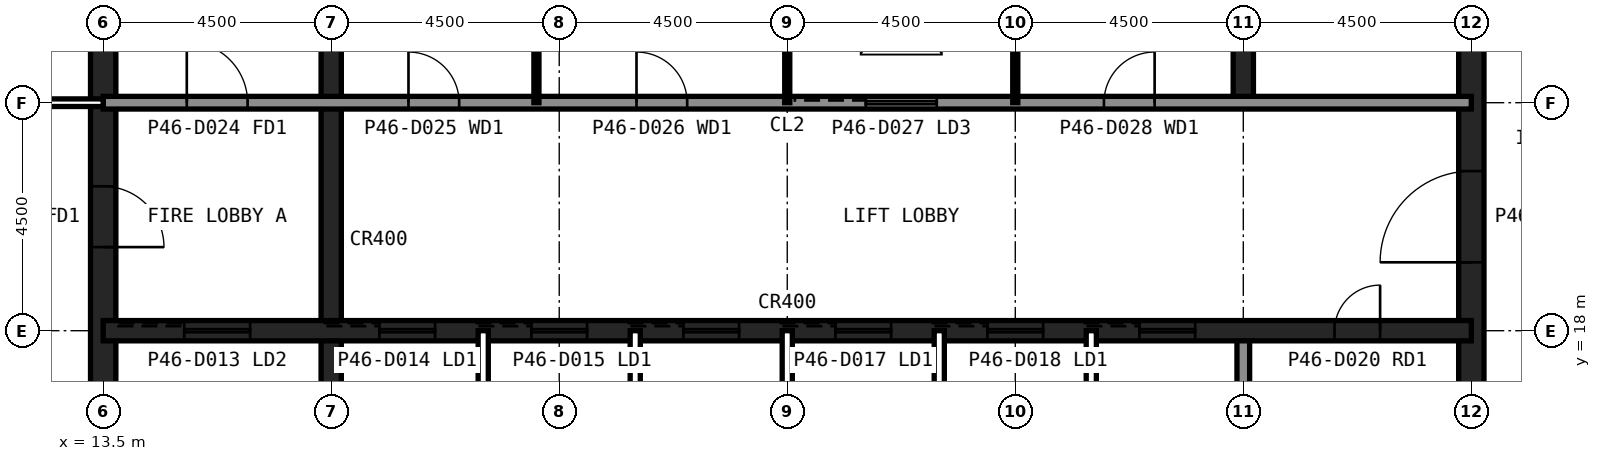
"""IFC4 building model, lengths in metres.
Left out: names, types, materials, properties, quantities, classifications, styles, units other than length and angle.
Written with IfcOpenShell. Run it as: python <this file> out.ifc"""

import sys

from ifc_helpers import new_model, si_unit, direction, frame, frame_2d, origin, place, context, subcontext, project, spatial, rectangle, extrude, element, fill, save


model = new_model("IFC4")
c1 = context("Model", 3, precision=1e-05, world=origin(), true_north=direction((0.0, 1.0)))
c2 = subcontext(c1, "Body", "Model", "MODEL_VIEW")
j1 = project(units=[si_unit("LENGTHUNIT", "METRE"), si_unit("PLANEANGLEUNIT", "RADIAN")], contexts=[c1])
p1 = place(None, origin())
s1 = spatial("IfcSite", under=j1, at=p1, CompositionType="ELEMENT")
p2 = place(p1, origin())
s2 = spatial("IfcBuilding", under=s1, at=p2, CompositionType="ELEMENT")
p3 = place(p2, frame((0.0, 0.0, 191.6)))
s3 = spatial("IfcBuildingStorey", under=s2, at=p3, CompositionType="ELEMENT", Elevation=191.6)
p4 = place(p3, frame((40.5, 13.5, 0.0), z_axis=(0.0, 0.0, 1.0), x_axis=(0.0, 1.0, 0.0)))
e1 = element("IfcWall", 1, at=p4, inside=s3, PredefinedType="SHEAR", context=c2, shape_type="SweptSolid", body=[
    extrude(rectangle(XDim=27.0, YDim=0.5, at=frame_2d((13.5, 0.0))), origin(), (0.0, 0.0, 1.0), 4.0),
])
p5 = place(p4, frame((5.85, 0.0, 0.0)))
e2 = element("IfcOpeningElement", 2, at=p5, cuts=e1, PredefinedType="OPENING", context=c2, shape_type="SweptSolid", body=[
    extrude(rectangle(XDim=1.8, YDim=2.1, at=frame_2d((0.9, 1.05))), frame((0.0, 0.26, 0.0), z_axis=(0.0, -1.0, 0.0), x_axis=(1.0, 0.0, 0.0)), (0.0, 0.0, 1.0), 0.52),
])
p6 = place(p4, frame((19.65, 0.0, 0.0)))
e3 = element("IfcOpeningElement", 3, at=p6, cuts=e1, PredefinedType="OPENING", context=c2, shape_type="SweptSolid", body=[
    extrude(rectangle(XDim=1.2, YDim=2.1, at=frame_2d((0.6, 1.05))), frame((0.0, 0.26, 0.0), z_axis=(0.0, -1.0, 0.0), x_axis=(1.0, 0.0, 0.0)), (0.0, 0.0, 1.0), 0.52),
])
p7 = place(p3, frame((13.5, 40.5, 0.0), z_axis=(0.0, 0.0, 1.0), x_axis=(0.0, -1.0, 0.0)))
e4 = element("IfcWall", 4, at=p7, inside=s3, PredefinedType="SHEAR", context=c2, shape_type="SweptSolid", body=[
    extrude(rectangle(XDim=27.0, YDim=0.5, at=frame_2d((13.5, 0.0))), origin(), (0.0, 0.0, 1.0), 4.0),
])
p8 = place(p7, frame((19.65, 0.0, 0.0)))
e5 = element("IfcOpeningElement", 5, at=p8, cuts=e4, PredefinedType="OPENING", context=c2, shape_type="SweptSolid", body=[
    extrude(rectangle(XDim=1.2, YDim=2.1, at=frame_2d((0.6, 1.05))), frame((0.0, 0.26, 0.0), z_axis=(0.0, -1.0, 0.0), x_axis=(1.0, 0.0, 0.0)), (0.0, 0.0, 1.0), 0.52),
])
p9 = place(p7, frame((5.85, 0.0, 0.0)))
e6 = element("IfcOpeningElement", 6, at=p9, cuts=e4, PredefinedType="OPENING", context=c2, shape_type="SweptSolid", body=[
    extrude(rectangle(XDim=1.8, YDim=2.1, at=frame_2d((0.9, 1.05))), frame((0.0, 0.26, 0.0), z_axis=(0.0, -1.0, 0.0), x_axis=(1.0, 0.0, 0.0)), (0.0, 0.0, 1.0), 0.52),
])
p10 = place(p3, frame((18.0, 13.5, 0.0), z_axis=(0.0, 0.0, 1.0), x_axis=(0.0, 1.0, 0.0)))
e7 = element("IfcWall", 7, at=p10, inside=s3, PredefinedType="SHEAR", context=c2, shape_type="SweptSolid", body=[
    extrude(rectangle(XDim=18.0, YDim=0.4, at=frame_2d((9.0, 0.0))), origin(), (0.0, 0.0, 1.0), 4.0),
])
p11 = place(p3, frame((36.0, 13.5, 0.0), z_axis=(0.0, 0.0, 1.0), x_axis=(0.0, 1.0, 0.0)))
e8 = element("IfcWall", 8, at=p11, inside=s3, PredefinedType="SOLIDWALL", context=c2, shape_type="SweptSolid", body=[
    extrude(rectangle(XDim=4.5, YDim=0.25, at=frame_2d((2.25, 0.0))), origin(), (0.0, 0.0, 1.0), 3.84),
])
p12 = place(p3, frame((36.0, 22.5, 0.0), z_axis=(0.0, 0.0, 1.0), x_axis=(0.0, 1.0, 0.0)))
e9 = element("IfcWall", 9, at=p12, inside=s3, PredefinedType="SHEAR", context=c2, shape_type="SweptSolid", body=[
    extrude(rectangle(XDim=18.0, YDim=0.4, at=frame_2d((9.0, 0.0))), origin(), (0.0, 0.0, 1.0), 4.0),
])
p13 = place(p3, frame((13.5, 18.0, 0.0), z_axis=(0.0, 0.0, 1.0), x_axis=(1.0, 0.0, 0.0)))
e10 = element("IfcWall", 10, at=p13, inside=s3, PredefinedType="SHEAR", context=c2, shape_type="SweptSolid", body=[
    extrude(rectangle(XDim=27.0, YDim=0.4, at=frame_2d((13.5, 0.0))), origin(), (0.0, 0.0, 1.0), 4.0),
])
p14 = place(p13, frame((24.3, 0.0, 0.0)))
e11 = element("IfcOpeningElement", 11, at=p14, cuts=e10, PredefinedType="OPENING", context=c2, shape_type="SweptSolid", body=[
    extrude(rectangle(XDim=0.9, YDim=2.1, at=frame_2d((0.45, 1.05))), frame((0.0, 0.21, 0.0), z_axis=(0.0, -1.0, 0.0), x_axis=(1.0, 0.0, 0.0)), (0.0, 0.0, 1.0), 0.42),
])
p15 = place(p13, frame((5.45, 0.0, 0.0)))
e12 = element("IfcOpeningElement", 12, at=p15, cuts=e10, PredefinedType="OPENING", context=c2, shape_type="SweptSolid", body=[
    extrude(rectangle(XDim=1.1, YDim=2.1, at=frame_2d((0.55, 1.05))), frame((0.0, 0.21, 0.0), z_axis=(0.0, -1.0, 0.0), x_axis=(1.0, 0.0, 0.0)), (0.0, 0.0, 1.0), 0.42),
])
p16 = place(p13, frame((8.45, 0.0, 0.0)))
e13 = element("IfcOpeningElement", 13, at=p16, cuts=e10, PredefinedType="OPENING", context=c2, shape_type="SweptSolid", body=[
    extrude(rectangle(XDim=1.1, YDim=2.1, at=frame_2d((0.55, 1.05))), frame((0.0, 0.21, 0.0), z_axis=(0.0, -1.0, 0.0), x_axis=(1.0, 0.0, 0.0)), (0.0, 0.0, 1.0), 0.42),
])
p17 = place(p13, frame((11.45, 0.0, 0.0)))
e14 = element("IfcOpeningElement", 14, at=p17, cuts=e10, PredefinedType="OPENING", context=c2, shape_type="SweptSolid", body=[
    extrude(rectangle(XDim=1.1, YDim=2.1, at=frame_2d((0.55, 1.05))), frame((0.0, 0.21, 0.0), z_axis=(0.0, -1.0, 0.0), x_axis=(1.0, 0.0, 0.0)), (0.0, 0.0, 1.0), 0.42),
])
p18 = place(p13, frame((14.45, 0.0, 0.0)))
e15 = element("IfcOpeningElement", 15, at=p18, cuts=e10, PredefinedType="OPENING", context=c2, shape_type="SweptSolid", body=[
    extrude(rectangle(XDim=1.1, YDim=2.1, at=frame_2d((0.55, 1.05))), frame((0.0, 0.21, 0.0), z_axis=(0.0, -1.0, 0.0), x_axis=(1.0, 0.0, 0.0)), (0.0, 0.0, 1.0), 0.42),
])
p19 = place(p13, frame((17.45, 0.0, 0.0)))
e16 = element("IfcOpeningElement", 16, at=p19, cuts=e10, PredefinedType="OPENING", context=c2, shape_type="SweptSolid", body=[
    extrude(rectangle(XDim=1.1, YDim=2.1, at=frame_2d((0.55, 1.05))), frame((0.0, 0.21, 0.0), z_axis=(0.0, -1.0, 0.0), x_axis=(1.0, 0.0, 0.0)), (0.0, 0.0, 1.0), 0.42),
])
p20 = place(p13, frame((20.45, 0.0, 0.0)))
e17 = element("IfcOpeningElement", 17, at=p20, cuts=e10, PredefinedType="OPENING", context=c2, shape_type="SweptSolid", body=[
    extrude(rectangle(XDim=1.1, YDim=2.1, at=frame_2d((0.55, 1.05))), frame((0.0, 0.21, 0.0), z_axis=(0.0, -1.0, 0.0), x_axis=(1.0, 0.0, 0.0)), (0.0, 0.0, 1.0), 0.42),
])
p21 = place(p13, frame((1.6, 0.0, 0.0)))
e18 = element("IfcOpeningElement", 18, at=p21, cuts=e10, PredefinedType="OPENING", context=c2, shape_type="SweptSolid", body=[
    extrude(rectangle(XDim=1.3, YDim=2.2, at=frame_2d((0.65, 1.1))), frame((0.0, 0.21, 0.0), z_axis=(0.0, -1.0, 0.0), x_axis=(1.0, 0.0, 0.0)), (0.0, 0.0, 1.0), 0.42),
])
p22 = place(p3, frame((13.5, 22.5, 0.0), z_axis=(0.0, 0.0, 1.0), x_axis=(1.0, 0.0, 0.0)))
e19 = element("IfcWall", 19, at=p22, inside=s3, PredefinedType="SOLIDWALL", context=c2, shape_type="SweptSolid", body=[
    extrude(rectangle(XDim=27.0, YDim=0.25, at=frame_2d((13.5, 0.0))), origin(), (0.0, 0.0, 1.0), 3.84),
])
p23 = place(p22, frame((1.65, 0.0, 0.0)))
e20 = element("IfcOpeningElement", 20, at=p23, cuts=e19, PredefinedType="OPENING", context=c2, shape_type="SweptSolid", body=[
    extrude(rectangle(XDim=1.2, YDim=2.1, at=frame_2d((0.6, 1.05))), frame((0.0, 0.135, 0.0), z_axis=(0.0, -1.0, 0.0), x_axis=(1.0, 0.0, 0.0)), (0.0, 0.0, 1.0), 0.27),
])
p24 = place(p22, frame((6.025, 0.0, 0.0)))
e21 = element("IfcOpeningElement", 21, at=p24, cuts=e19, PredefinedType="OPENING", context=c2, shape_type="SweptSolid", body=[
    extrude(rectangle(XDim=1.0, YDim=2.1, at=frame_2d((0.5, 1.05))), frame((0.0, 0.135, 0.0), z_axis=(0.0, -1.0, 0.0), x_axis=(1.0, 0.0, 0.0)), (0.0, 0.0, 1.0), 0.27),
])
p25 = place(p22, frame((10.525, 0.0, 0.0)))
e22 = element("IfcOpeningElement", 22, at=p25, cuts=e19, PredefinedType="OPENING", context=c2, shape_type="SweptSolid", body=[
    extrude(rectangle(XDim=1.0, YDim=2.1, at=frame_2d((0.5, 1.05))), frame((0.0, 0.135, 0.0), z_axis=(0.0, -1.0, 0.0), x_axis=(1.0, 0.0, 0.0)), (0.0, 0.0, 1.0), 0.27),
])
p26 = place(p22, frame((19.75, 0.0, 0.0)))
e23 = element("IfcOpeningElement", 23, at=p26, cuts=e19, PredefinedType="OPENING", context=c2, shape_type="SweptSolid", body=[
    extrude(rectangle(XDim=1.0, YDim=2.1, at=frame_2d((0.5, 1.05))), frame((0.0, 0.135, 0.0), z_axis=(0.0, -1.0, 0.0), x_axis=(1.0, 0.0, 0.0)), (0.0, 0.0, 1.0), 0.27),
])
p27 = place(p22, frame((15.05, 0.0, 0.0)))
e24 = element("IfcOpeningElement", 24, at=p27, cuts=e19, PredefinedType="OPENING", context=c2, shape_type="SweptSolid", body=[
    extrude(rectangle(XDim=1.4, YDim=2.4, at=frame_2d((0.7, 1.2))), frame((0.0, 0.135, 0.0), z_axis=(0.0, -1.0, 0.0), x_axis=(1.0, 0.0, 0.0)), (0.0, 0.0, 1.0), 0.27),
])
for number, where, z_axis, x_axis in (
    (25, (21.0, 13.5, 0.0), (0.0, 0.0, 1.0), (0.0, 1.0, 0.0)),
    (26, (24.0, 13.5, 0.0), (0.0, 0.0, 1.0), (0.0, 1.0, 0.0)),
    (27, (27.0, 13.5, 0.0), (0.0, 0.0, 1.0), (0.0, 1.0, 0.0)),
    (28, (30.0, 13.5, 0.0), (0.0, 0.0, 1.0), (0.0, 1.0, 0.0)),
    (29, (33.0, 13.5, 0.0), (0.0, 0.0, 1.0), (0.0, 1.0, 0.0)),
):
    element("IfcWall", number, at=place(p3, frame(where, z_axis=z_axis, x_axis=x_axis)), inside=s3, PredefinedType="PARTITIONING", context=c2, shape_type="SweptSolid", body=[
        extrude(rectangle(XDim=4.5, YDim=0.2, at=frame_2d((2.25, 0.0))), origin(), (0.0, 0.0, 1.0), 3.84),
    ])
for number, where, z_axis, x_axis in (
    (30, (22.05, 22.5, 0.0), (0.0, 0.0, 1.0), (0.0, 1.0, 0.0)),
    (31, (27.0, 22.5, 0.0), (0.0, 0.0, 1.0), (0.0, 1.0, 0.0)),
    (32, (31.5, 22.5, 0.0), (0.0, 0.0, 1.0), (0.0, 1.0, 0.0)),
):
    element("IfcWall", number, at=place(p3, frame(where, z_axis=z_axis, x_axis=x_axis)), inside=s3, PredefinedType="PLUMBINGWALL", context=c2, shape_type="SweptSolid", body=[
        extrude(rectangle(XDim=9.0, YDim=0.1, at=frame_2d((4.5, 0.0))), origin(), (0.0, 0.0, 1.0), 3.84),
    ])
p28 = place(p3, frame((9.9, 22.5, 0.0), z_axis=(0.0, 0.0, 1.0), x_axis=(1.0, 0.0, 0.0)))
e33 = element("IfcWall", 33, at=p28, inside=s3, PredefinedType="PARTITIONING", context=c2, shape_type="SweptSolid", body=[
    extrude(rectangle(XDim=3.6, YDim=0.15, at=frame_2d((1.8, 0.0))), origin(), (0.0, 0.0, 1.0), 2.989),
])
p29 = place(p8, origin())
e34 = element("IfcDoor", 34, at=p29, inside=s3, OperationType="SINGLE_SWING_RIGHT", PredefinedType="DOOR", context=c2, shape_type="SweptSolid", body=[
    extrude(rectangle(XDim=1.2, YDim=2.1, at=frame_2d((0.6, 1.05))), frame((0.0, 0.025, 0.0), z_axis=(0.0, -1.0, 0.0), x_axis=(1.0, 0.0, 0.0)), (0.0, 0.0, 1.0), 0.05),
])
fill(e5, e34)
p30 = place(p5, origin())
e35 = element("IfcDoor", 35, at=p30, inside=s3, OperationType="SINGLE_SWING_LEFT", PredefinedType="DOOR", context=c2, shape_type="SweptSolid", body=[
    extrude(rectangle(XDim=1.8, YDim=2.1, at=frame_2d((0.9, 1.05))), frame((0.0, 0.025, 0.0), z_axis=(0.0, -1.0, 0.0), x_axis=(1.0, 0.0, 0.0)), (0.0, 0.0, 1.0), 0.05),
])
fill(e2, e35)
p31 = place(p23, origin())
e36 = element("IfcDoor", 36, at=p31, inside=s3, OperationType="SINGLE_SWING_LEFT", PredefinedType="DOOR", context=c2, shape_type="SweptSolid", body=[
    extrude(rectangle(XDim=1.2, YDim=2.1, at=frame_2d((0.6, 1.05))), frame((0.0, 0.025, 0.0), z_axis=(0.0, -1.0, 0.0), x_axis=(1.0, 0.0, 0.0)), (0.0, 0.0, 1.0), 0.05),
])
fill(e20, e36)
p32 = place(p24, origin())
e37 = element("IfcDoor", 37, at=p32, inside=s3, OperationType="SINGLE_SWING_LEFT", PredefinedType="DOOR", context=c2, shape_type="SweptSolid", body=[
    extrude(rectangle(XDim=1.0, YDim=2.1, at=frame_2d((0.5, 1.05))), frame((0.0, 0.025, 0.0), z_axis=(0.0, -1.0, 0.0), x_axis=(1.0, 0.0, 0.0)), (0.0, 0.0, 1.0), 0.05),
])
fill(e21, e37)
p33 = place(p25, origin())
e38 = element("IfcDoor", 38, at=p33, inside=s3, OperationType="SINGLE_SWING_LEFT", PredefinedType="DOOR", context=c2, shape_type="SweptSolid", body=[
    extrude(rectangle(XDim=1.0, YDim=2.1, at=frame_2d((0.5, 1.05))), frame((0.0, 0.025, 0.0), z_axis=(0.0, -1.0, 0.0), x_axis=(1.0, 0.0, 0.0)), (0.0, 0.0, 1.0), 0.05),
])
fill(e22, e38)
p34 = place(p26, origin())
e39 = element("IfcDoor", 39, at=p34, inside=s3, OperationType="SINGLE_SWING_RIGHT", PredefinedType="DOOR", context=c2, shape_type="SweptSolid", body=[
    extrude(rectangle(XDim=1.0, YDim=2.1, at=frame_2d((0.5, 1.05))), frame((0.0, 0.025, 0.0), z_axis=(0.0, -1.0, 0.0), x_axis=(1.0, 0.0, 0.0)), (0.0, 0.0, 1.0), 0.05),
])
fill(e23, e39)
p35 = place(p14, origin())
e40 = element("IfcDoor", 40, at=p35, inside=s3, OperationType="SINGLE_SWING_RIGHT", PredefinedType="DOOR", context=c2, shape_type="SweptSolid", body=[
    extrude(rectangle(XDim=0.9, YDim=2.1, at=frame_2d((0.45, 1.05))), frame((0.0, 0.025, 0.0), z_axis=(0.0, -1.0, 0.0), x_axis=(1.0, 0.0, 0.0)), (0.0, 0.0, 1.0), 0.05),
])
fill(e11, e40)
p36 = place(p15, origin())
e41 = element("IfcDoor", 41, at=p36, inside=s3, OperationType="SLIDING_TO_LEFT", PredefinedType="DOOR", context=c2, shape_type="SweptSolid", body=[
    extrude(rectangle(XDim=1.1, YDim=2.1, at=frame_2d((0.55, 1.05))), frame((0.0, 0.025, 0.0), z_axis=(0.0, -1.0, 0.0), x_axis=(1.0, 0.0, 0.0)), (0.0, 0.0, 1.0), 0.05),
])
fill(e12, e41)
p37 = place(p16, origin())
e42 = element("IfcDoor", 42, at=p37, inside=s3, OperationType="SLIDING_TO_LEFT", PredefinedType="DOOR", context=c2, shape_type="SweptSolid", body=[
    extrude(rectangle(XDim=1.1, YDim=2.1, at=frame_2d((0.55, 1.05))), frame((0.0, 0.025, 0.0), z_axis=(0.0, -1.0, 0.0), x_axis=(1.0, 0.0, 0.0)), (0.0, 0.0, 1.0), 0.05),
])
fill(e13, e42)
p38 = place(p17, origin())
e43 = element("IfcDoor", 43, at=p38, inside=s3, OperationType="SLIDING_TO_LEFT", PredefinedType="DOOR", context=c2, shape_type="SweptSolid", body=[
    extrude(rectangle(XDim=1.1, YDim=2.1, at=frame_2d((0.55, 1.05))), frame((0.0, 0.025, 0.0), z_axis=(0.0, -1.0, 0.0), x_axis=(1.0, 0.0, 0.0)), (0.0, 0.0, 1.0), 0.05),
])
fill(e14, e43)
p39 = place(p18, origin())
e44 = element("IfcDoor", 44, at=p39, inside=s3, OperationType="SLIDING_TO_LEFT", PredefinedType="DOOR", context=c2, shape_type="SweptSolid", body=[
    extrude(rectangle(XDim=1.1, YDim=2.1, at=frame_2d((0.55, 1.05))), frame((0.0, 0.025, 0.0), z_axis=(0.0, -1.0, 0.0), x_axis=(1.0, 0.0, 0.0)), (0.0, 0.0, 1.0), 0.05),
])
fill(e15, e44)
p40 = place(p19, origin())
e45 = element("IfcDoor", 45, at=p40, inside=s3, OperationType="SLIDING_TO_LEFT", PredefinedType="DOOR", context=c2, shape_type="SweptSolid", body=[
    extrude(rectangle(XDim=1.1, YDim=2.1, at=frame_2d((0.55, 1.05))), frame((0.0, 0.025, 0.0), z_axis=(0.0, -1.0, 0.0), x_axis=(1.0, 0.0, 0.0)), (0.0, 0.0, 1.0), 0.05),
])
fill(e16, e45)
p41 = place(p20, origin())
e46 = element("IfcDoor", 46, at=p41, inside=s3, OperationType="SLIDING_TO_LEFT", PredefinedType="DOOR", context=c2, shape_type="SweptSolid", body=[
    extrude(rectangle(XDim=1.1, YDim=2.1, at=frame_2d((0.55, 1.05))), frame((0.0, 0.025, 0.0), z_axis=(0.0, -1.0, 0.0), x_axis=(1.0, 0.0, 0.0)), (0.0, 0.0, 1.0), 0.05),
])
fill(e17, e46)
p42 = place(p21, origin())
e47 = element("IfcDoor", 47, at=p42, inside=s3, OperationType="SLIDING_TO_LEFT", PredefinedType="DOOR", context=c2, shape_type="SweptSolid", body=[
    extrude(rectangle(XDim=1.3, YDim=2.2, at=frame_2d((0.65, 1.1))), frame((0.0, 0.025, 0.0), z_axis=(0.0, -1.0, 0.0), x_axis=(1.0, 0.0, 0.0)), (0.0, 0.0, 1.0), 0.05),
])
fill(e18, e47)
p43 = place(p27, origin())
e48 = element("IfcDoor", 48, at=p43, inside=s3, OperationType="SLIDING_TO_LEFT", PredefinedType="DOOR", context=c2, shape_type="SweptSolid", body=[
    extrude(rectangle(XDim=1.4, YDim=2.4, at=frame_2d((0.7, 1.2))), frame((0.0, 0.025, 0.0), z_axis=(0.0, -1.0, 0.0), x_axis=(1.0, 0.0, 0.0)), (0.0, 0.0, 1.0), 0.05),
])
fill(e24, e48)
save(model, sys.argv[1])
